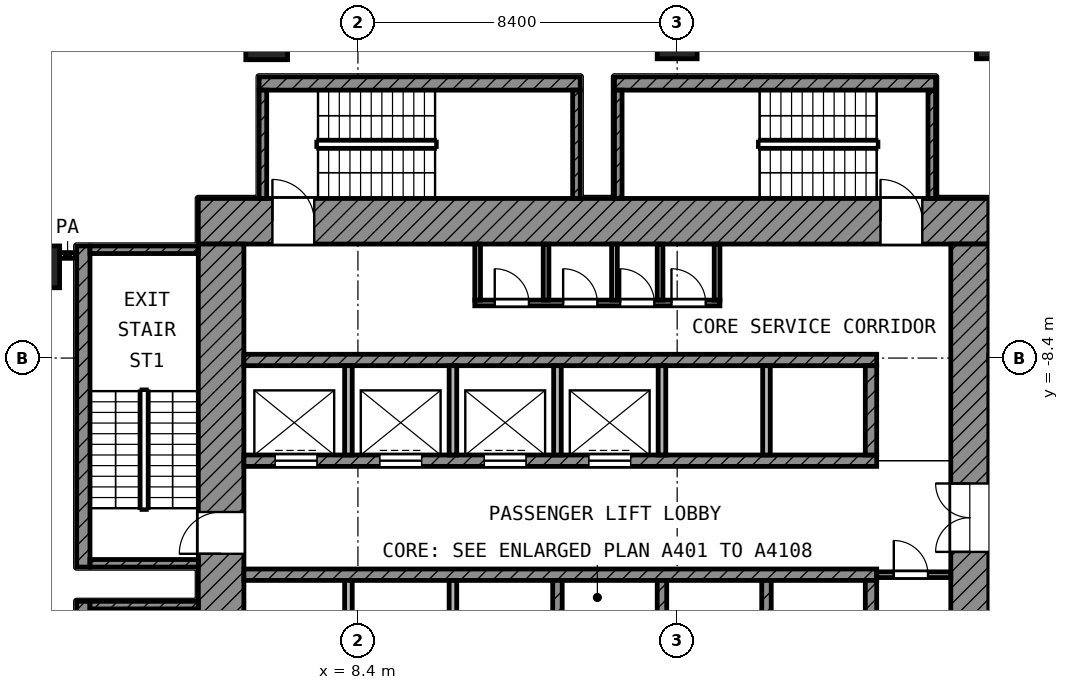
"""IFC4 building model, lengths in metres.
Left out: names, types, materials, properties, quantities, classifications, styles, units other than length and angle.
Written with IfcOpenShell. Run it as: python <this file> out.ifc"""

import sys

from ifc_helpers import new_model, si_unit, direction, frame, frame_2d, origin, origin_2d, place, context, subcontext, project, spatial, rectangle, extrude, element, fill, save


model = new_model("IFC4")
c1 = context("Model", 3, precision=1e-05, world=origin(), true_north=direction((0.0, 1.0)))
c2 = subcontext(c1, "Body", "Model", "MODEL_VIEW")
j1 = project(units=[si_unit("LENGTHUNIT", "METRE"), si_unit("PLANEANGLEUNIT", "RADIAN")], contexts=[c1])
p1 = place(None, origin())
s1 = spatial("IfcSite", under=j1, at=p1, CompositionType="ELEMENT")
p2 = place(p1, origin())
s2 = spatial("IfcBuilding", under=s1, at=p2, CompositionType="ELEMENT")
p3 = place(p2, frame((0.0, 0.0, 115.6)))
s3 = spatial("IfcBuildingStorey", under=s2, at=p3, CompositionType="ELEMENT", Elevation=115.6)
p4 = place(p3, frame((6.0, 0.0, 0.0), z_axis=(0.0, 0.0, 1.0), x_axis=(1.0, 0.0, 0.0)))
e1 = element("IfcColumn", 1, at=p4, inside=s3, PredefinedType="COLUMN", context=c2, shape_type="SweptSolid", body=[
    extrude(rectangle(XDim=1.1, YDim=1.1, at=origin_2d()), origin(), (0.0, 0.0, 1.0), 4.2),
])
for number, where, z_axis, x_axis in (
    (2, (16.8, 0.0, 0.0), (0.0, 0.0, 1.0), (1.0, 0.0, 0.0)),
    (3, (25.2, 0.0, 0.0), (0.0, 0.0, 1.0), (1.0, 0.0, 0.0)),
):
    element("IfcColumn", number, at=place(p3, frame(where, z_axis=z_axis, x_axis=x_axis)), inside=s3, PredefinedType="COLUMN", context=c2, shape_type="SweptSolid", body=[
        extrude(rectangle(XDim=1.05, YDim=1.05, at=origin_2d()), origin(), (0.0, 0.0, 1.0), 4.2),
    ])
p5 = place(p3, frame((0.0, -6.0, 0.0), z_axis=(0.0, 0.0, 1.0), x_axis=(1.0, 0.0, 0.0)))
e4 = element("IfcColumn", 4, at=p5, inside=s3, PredefinedType="COLUMN", context=c2, shape_type="SweptSolid", body=[
    extrude(rectangle(XDim=1.1, YDim=1.1, at=origin_2d()), origin(), (0.0, 0.0, 1.0), 4.2),
])
p6 = place(p3, frame((4.2, -4.8, 0.0), z_axis=(0.0, 0.0, 1.0), x_axis=(1.0, 0.0, 0.0)))
e5 = element("IfcWall", 5, at=p6, inside=s3, PredefinedType="SHEAR", context=c2, shape_type="SweptSolid", body=[
    extrude(rectangle(XDim=20.8, YDim=1.2, at=frame_2d((10.4, 0.0))), origin(), (0.0, 0.0, 1.0), 3.6),
])
p7 = place(p6, frame((1.95, 0.0, 0.0)))
e6 = element("IfcOpeningElement", 6, at=p7, cuts=e5, PredefinedType="OPENING", context=c2, shape_type="SweptSolid", body=[
    extrude(rectangle(XDim=1.1, YDim=2.1, at=frame_2d((0.55, 1.05))), frame((0.0, 0.61, 0.0), z_axis=(0.0, -1.0, 0.0), x_axis=(1.0, 0.0, 0.0)), (0.0, 0.0, 1.0), 1.22),
])
p8 = place(p6, frame((17.95, 0.0, 0.0)))
e7 = element("IfcOpeningElement", 7, at=p8, cuts=e5, PredefinedType="OPENING", context=c2, shape_type="SweptSolid", body=[
    extrude(rectangle(XDim=1.1, YDim=2.1, at=frame_2d((0.55, 1.05))), frame((0.0, 0.61, 0.0), z_axis=(0.0, -1.0, 0.0), x_axis=(1.0, 0.0, 0.0)), (0.0, 0.0, 1.0), 1.22),
])
p9 = place(p3, frame((4.8, -25.0, 0.0), z_axis=(0.0, 0.0, 1.0), x_axis=(0.0, 1.0, 0.0)))
e8 = element("IfcWall", 8, at=p9, inside=s3, PredefinedType="SHEAR", context=c2, shape_type="SweptSolid", body=[
    extrude(rectangle(XDim=19.6, YDim=1.2, at=frame_2d((9.8, 0.0))), origin(), (0.0, 0.0, 1.0), 3.6),
])
p10 = place(p9, frame((11.45, 0.0, 0.0)))
e9 = element("IfcOpeningElement", 9, at=p10, cuts=e8, PredefinedType="OPENING", context=c2, shape_type="SweptSolid", body=[
    extrude(rectangle(XDim=1.1, YDim=2.1, at=frame_2d((0.55, 1.05))), frame((0.0, 0.61, 0.0), z_axis=(0.0, -1.0, 0.0), x_axis=(1.0, 0.0, 0.0)), (0.0, 0.0, 1.0), 1.22),
])
p11 = place(p9, frame((2.15, 0.0, 0.0)))
e10 = element("IfcOpeningElement", 10, at=p11, cuts=e8, PredefinedType="OPENING", context=c2, shape_type="SweptSolid", body=[
    extrude(rectangle(XDim=1.1, YDim=2.1, at=frame_2d((0.55, 1.05))), frame((0.0, 0.61, 0.0), z_axis=(0.0, -1.0, 0.0), x_axis=(1.0, 0.0, 0.0)), (0.0, 0.0, 1.0), 1.22),
])
p12 = place(p3, frame((24.5, -24.0, 0.0), z_axis=(0.0, 0.0, 1.0), x_axis=(0.0, 1.0, 0.0)))
e11 = element("IfcWall", 11, at=p12, inside=s3, PredefinedType="SHEAR", context=c2, shape_type="SweptSolid", body=[
    extrude(rectangle(XDim=18.6, YDim=1.0, at=frame_2d((9.3, 0.0))), origin(), (0.0, 0.0, 1.0), 3.6),
])
p13 = place(p12, frame((10.5, 0.0, 0.0)))
e12 = element("IfcOpeningElement", 12, at=p13, cuts=e11, PredefinedType="OPENING", context=c2, shape_type="SweptSolid", body=[
    extrude(rectangle(XDim=1.8, YDim=2.1, at=frame_2d((0.9, 1.05))), frame((0.0, 0.51, 0.0), z_axis=(0.0, -1.0, 0.0), x_axis=(1.0, 0.0, 0.0)), (0.0, 0.0, 1.0), 1.02),
])
p14 = place(p3, frame((5.4, -8.45, 0.0), z_axis=(0.0, 0.0, 1.0), x_axis=(1.0, 0.0, 0.0)))
e13 = element("IfcWall", 13, at=p14, inside=s3, PredefinedType="SHEAR", context=c2, shape_type="SweptSolid", body=[
    extrude(rectangle(XDim=16.65, YDim=0.3, at=frame_2d((8.325, 0.0))), origin(), (0.0, 0.0, 1.0), 3.6),
])
p15 = place(p3, frame((5.4, -11.1, 0.0), z_axis=(0.0, 0.0, 1.0), x_axis=(1.0, 0.0, 0.0)))
e14 = element("IfcWall", 14, at=p15, inside=s3, PredefinedType="SHEAR", context=c2, shape_type="SweptSolid", body=[
    extrude(rectangle(XDim=16.65, YDim=0.3, at=frame_2d((8.325, 0.0))), origin(), (0.0, 0.0, 1.0), 3.6),
])
p16 = place(p15, frame((0.825, 0.0, 0.0)))
e15 = element("IfcOpeningElement", 15, at=p16, cuts=e14, PredefinedType="OPENING", context=c2, shape_type="SweptSolid", body=[
    extrude(rectangle(XDim=1.1, YDim=2.1, at=frame_2d((0.55, 1.05))), frame((0.0, 0.16, 0.0), z_axis=(0.0, -1.0, 0.0), x_axis=(1.0, 0.0, 0.0)), (0.0, 0.0, 1.0), 0.32),
])
p17 = place(p15, frame((3.575, 0.0, 0.0)))
e16 = element("IfcOpeningElement", 16, at=p17, cuts=e14, PredefinedType="OPENING", context=c2, shape_type="SweptSolid", body=[
    extrude(rectangle(XDim=1.1, YDim=2.1, at=frame_2d((0.55, 1.05))), frame((0.0, 0.16, 0.0), z_axis=(0.0, -1.0, 0.0), x_axis=(1.0, 0.0, 0.0)), (0.0, 0.0, 1.0), 0.32),
])
p18 = place(p15, frame((6.325, 0.0, 0.0)))
e17 = element("IfcOpeningElement", 17, at=p18, cuts=e14, PredefinedType="OPENING", context=c2, shape_type="SweptSolid", body=[
    extrude(rectangle(XDim=1.1, YDim=2.1, at=frame_2d((0.55, 1.05))), frame((0.0, 0.16, 0.0), z_axis=(0.0, -1.0, 0.0), x_axis=(1.0, 0.0, 0.0)), (0.0, 0.0, 1.0), 0.32),
])
p19 = place(p15, frame((9.075, 0.0, 0.0)))
e18 = element("IfcOpeningElement", 18, at=p19, cuts=e14, PredefinedType="OPENING", context=c2, shape_type="SweptSolid", body=[
    extrude(rectangle(XDim=1.1, YDim=2.1, at=frame_2d((0.55, 1.05))), frame((0.0, 0.16, 0.0), z_axis=(0.0, -1.0, 0.0), x_axis=(1.0, 0.0, 0.0)), (0.0, 0.0, 1.0), 0.32),
])
p20 = place(p3, frame((5.4, -14.1, 0.0), z_axis=(0.0, 0.0, 1.0), x_axis=(1.0, 0.0, 0.0)))
e19 = element("IfcWall", 19, at=p20, inside=s3, PredefinedType="SHEAR", context=c2, shape_type="SweptSolid", body=[
    extrude(rectangle(XDim=16.65, YDim=0.3, at=frame_2d((8.325, 0.0))), origin(), (0.0, 0.0, 1.0), 3.6),
])
p21 = place(p3, frame((21.9, -10.95, 0.0), z_axis=(0.0, 0.0, 1.0), x_axis=(0.0, 1.0, 0.0)))
e20 = element("IfcWall", 20, at=p21, inside=s3, PredefinedType="SHEAR", context=c2, shape_type="SweptSolid", body=[
    extrude(rectangle(XDim=2.35, YDim=0.3, at=frame_2d((1.175, 0.0))), origin(), (0.0, 0.0, 1.0), 3.6),
])
p22 = place(p3, frame((21.9, -16.6, 0.0), z_axis=(0.0, 0.0, 1.0), x_axis=(0.0, 1.0, 0.0)))
e21 = element("IfcWall", 21, at=p22, inside=s3, PredefinedType="SHEAR", context=c2, shape_type="SweptSolid", body=[
    extrude(rectangle(XDim=2.35, YDim=0.3, at=frame_2d((1.175, 0.0))), origin(), (0.0, 0.0, 1.0), 3.6),
])
for number, where, z_axis, x_axis in (
    (22, (8.15, -10.95, 0.0), (0.0, 0.0, 1.0), (0.0, 1.0, 0.0)),
    (23, (10.9, -10.95, 0.0), (0.0, 0.0, 1.0), (0.0, 1.0, 0.0)),
    (24, (13.65, -10.95, 0.0), (0.0, 0.0, 1.0), (0.0, 1.0, 0.0)),
    (25, (16.4, -10.95, 0.0), (0.0, 0.0, 1.0), (0.0, 1.0, 0.0)),
    (26, (19.15, -10.95, 0.0), (0.0, 0.0, 1.0), (0.0, 1.0, 0.0)),
):
    element("IfcWall", number, at=place(p3, frame(where, z_axis=z_axis, x_axis=x_axis)), inside=s3, PredefinedType="PARTITIONING", context=c2, shape_type="SweptSolid", body=[
        extrude(rectangle(XDim=2.35, YDim=0.2, at=frame_2d((1.175, 0.0))), origin(), (0.0, 0.0, 1.0), 3.6),
    ])
for number, where, z_axis, x_axis in (
    (27, (8.15, -16.6, 0.0), (0.0, 0.0, 1.0), (0.0, 1.0, 0.0)),
    (28, (10.9, -16.6, 0.0), (0.0, 0.0, 1.0), (0.0, 1.0, 0.0)),
):
    element("IfcWall", number, at=place(p3, frame(where, z_axis=z_axis, x_axis=x_axis)), inside=s3, PredefinedType="PARTITIONING", context=c2, shape_type="SweptSolid", body=[
        extrude(rectangle(XDim=2.35, YDim=0.2, at=frame_2d((1.175, 0.0))), origin(), (0.0, 0.0, 1.0), 3.6),
    ])
for number, where, z_axis, x_axis in (
    (29, (13.65, -16.6, 0.0), (0.0, 0.0, 1.0), (0.0, 1.0, 0.0)),
    (30, (16.4, -16.6, 0.0), (0.0, 0.0, 1.0), (0.0, 1.0, 0.0)),
    (31, (19.15, -16.6, 0.0), (0.0, 0.0, 1.0), (0.0, 1.0, 0.0)),
):
    element("IfcWall", number, at=place(p3, frame(where, z_axis=z_axis, x_axis=x_axis)), inside=s3, PredefinedType="SHEAR", context=c2, shape_type="SweptSolid", body=[
        extrude(rectangle(XDim=2.35, YDim=0.25, at=frame_2d((1.175, 0.0))), origin(), (0.0, 0.0, 1.0), 3.6),
    ])
p23 = place(p3, frame((22.05, -14.1, 0.0), z_axis=(0.0, 0.0, 1.0), x_axis=(1.0, 0.0, 0.0)))
e32 = element("IfcWall", 32, at=p23, inside=s3, PredefinedType="PARTITIONING", context=c2, shape_type="SweptSolid", body=[
    extrude(rectangle(XDim=1.95, YDim=0.15, at=frame_2d((0.975, 0.0))), origin(), (0.0, 0.0, 1.0), 3.6),
])
p24 = place(p23, frame((0.45, 0.0, 0.0)))
e33 = element("IfcOpeningElement", 33, at=p24, cuts=e32, PredefinedType="OPENING", context=c2, shape_type="SweptSolid", body=[
    extrude(rectangle(XDim=0.9, YDim=2.1, at=frame_2d((0.45, 1.05))), frame((0.0, 0.085, 0.0), z_axis=(0.0, -1.0, 0.0), x_axis=(1.0, 0.0, 0.0)), (0.0, 0.0, 1.0), 0.17),
])
p25 = place(p3, frame((11.475, -6.95, 0.0), z_axis=(0.0, 0.0, 1.0), x_axis=(1.0, 0.0, 0.0)))
e34 = element("IfcWall", 34, at=p25, inside=s3, PredefinedType="PARTITIONING", context=c2, shape_type="SweptSolid", body=[
    extrude(rectangle(XDim=6.45, YDim=0.15, at=frame_2d((3.225, 0.0))), origin(), (0.0, 0.0, 1.0), 3.6),
])
p26 = place(p25, frame((0.525, 0.0, 0.0)))
e35 = element("IfcOpeningElement", 35, at=p26, cuts=e34, PredefinedType="OPENING", context=c2, shape_type="SweptSolid", body=[
    extrude(rectangle(XDim=0.9, YDim=2.1, at=frame_2d((0.45, 1.05))), frame((0.0, 0.085, 0.0), z_axis=(0.0, -1.0, 0.0), x_axis=(1.0, 0.0, 0.0)), (0.0, 0.0, 1.0), 0.17),
])
p27 = place(p25, frame((2.325, 0.0, 0.0)))
e36 = element("IfcOpeningElement", 36, at=p27, cuts=e34, PredefinedType="OPENING", context=c2, shape_type="SweptSolid", body=[
    extrude(rectangle(XDim=0.9, YDim=2.1, at=frame_2d((0.45, 1.05))), frame((0.0, 0.085, 0.0), z_axis=(0.0, -1.0, 0.0), x_axis=(1.0, 0.0, 0.0)), (0.0, 0.0, 1.0), 0.17),
])
p28 = place(p25, frame((3.825, 0.0, 0.0)))
e37 = element("IfcOpeningElement", 37, at=p28, cuts=e34, PredefinedType="OPENING", context=c2, shape_type="SweptSolid", body=[
    extrude(rectangle(XDim=0.9, YDim=2.1, at=frame_2d((0.45, 1.05))), frame((0.0, 0.085, 0.0), z_axis=(0.0, -1.0, 0.0), x_axis=(1.0, 0.0, 0.0)), (0.0, 0.0, 1.0), 0.17),
])
p29 = place(p25, frame((5.175, 0.0, 0.0)))
e38 = element("IfcOpeningElement", 38, at=p29, cuts=e34, PredefinedType="OPENING", context=c2, shape_type="SweptSolid", body=[
    extrude(rectangle(XDim=0.9, YDim=2.1, at=frame_2d((0.45, 1.05))), frame((0.0, 0.085, 0.0), z_axis=(0.0, -1.0, 0.0), x_axis=(1.0, 0.0, 0.0)), (0.0, 0.0, 1.0), 0.17),
])
for number, where, z_axis, x_axis in (
    (39, (11.55, -6.875, 0.0), (0.0, 0.0, 1.0), (0.0, 1.0, 0.0)),
    (40, (13.35, -6.875, 0.0), (0.0, 0.0, 1.0), (0.0, 1.0, 0.0)),
    (41, (15.15, -6.875, 0.0), (0.0, 0.0, 1.0), (0.0, 1.0, 0.0)),
    (42, (16.35, -6.875, 0.0), (0.0, 0.0, 1.0), (0.0, 1.0, 0.0)),
    (43, (17.85, -6.875, 0.0), (0.0, 0.0, 1.0), (0.0, 1.0, 0.0)),
):
    element("IfcWall", number, at=place(p3, frame(where, z_axis=z_axis, x_axis=x_axis)), inside=s3, PredefinedType="PARTITIONING", context=c2, shape_type="SweptSolid", body=[
        extrude(rectangle(XDim=1.475, YDim=0.15, at=frame_2d((0.738, 0.0))), origin(), (0.0, 0.0, 1.0), 3.6),
    ])
p30 = place(p3, frame((1.175, -13.9, 0.0), z_axis=(0.0, 0.0, 1.0), x_axis=(0.0, 1.0, 0.0)))
e44 = element("IfcWall", 44, at=p30, inside=s3, PredefinedType="SHEAR", context=c2, shape_type="SweptSolid", body=[
    extrude(rectangle(XDim=8.45, YDim=0.35, at=frame_2d((4.225, 0.0))), origin(), (0.0, 0.0, 1.0), 3.6),
])
for number, where, z_axis, x_axis in (
    (45, (1.35, -5.55, 0.0), (0.0, 0.0, 1.0), (1.0, 0.0, 0.0)),
    (46, (1.35, -13.8, 0.0), (0.0, 0.0, 1.0), (1.0, 0.0, 0.0)),
):
    element("IfcWall", number, at=place(p3, frame(where, z_axis=z_axis, x_axis=x_axis)), inside=s3, PredefinedType="SHEAR", context=c2, shape_type="SweptSolid", body=[
        extrude(rectangle(XDim=2.85, YDim=0.2, at=frame_2d((1.425, 0.0))), origin(), (0.0, 0.0, 1.0), 3.6),
    ])
p31 = place(p3, frame((1.175, -23.25, 0.0), z_axis=(0.0, 0.0, 1.0), x_axis=(0.0, 1.0, 0.0)))
e47 = element("IfcWall", 47, at=p31, inside=s3, PredefinedType="SHEAR", context=c2, shape_type="SweptSolid", body=[
    extrude(rectangle(XDim=8.45, YDim=0.35, at=frame_2d((4.225, 0.0))), origin(), (0.0, 0.0, 1.0), 3.6),
])
p32 = place(p3, frame((1.35, -14.9, 0.0), z_axis=(0.0, 0.0, 1.0), x_axis=(1.0, 0.0, 0.0)))
e48 = element("IfcWall", 48, at=p32, inside=s3, PredefinedType="SHEAR", context=c2, shape_type="SweptSolid", body=[
    extrude(rectangle(XDim=2.85, YDim=0.2, at=frame_2d((1.425, 0.0))), origin(), (0.0, 0.0, 1.0), 3.6),
])
p33 = place(p3, frame((5.8, -1.175, 0.0), z_axis=(0.0, 0.0, 1.0), x_axis=(1.0, 0.0, 0.0)))
e49 = element("IfcWall", 49, at=p33, inside=s3, PredefinedType="SHEAR", context=c2, shape_type="SweptSolid", body=[
    extrude(rectangle(XDim=8.45, YDim=0.35, at=frame_2d((4.225, 0.0))), origin(), (0.0, 0.0, 1.0), 3.6),
])
for number, where, z_axis, x_axis in (
    (50, (5.9, -4.2, 0.0), (0.0, 0.0, 1.0), (0.0, 1.0, 0.0)),
    (51, (14.15, -4.2, 0.0), (0.0, 0.0, 1.0), (0.0, 1.0, 0.0)),
):
    element("IfcWall", number, at=place(p3, frame(where, z_axis=z_axis, x_axis=x_axis)), inside=s3, PredefinedType="SHEAR", context=c2, shape_type="SweptSolid", body=[
        extrude(rectangle(XDim=2.85, YDim=0.2, at=frame_2d((1.425, 0.0))), origin(), (0.0, 0.0, 1.0), 3.6),
    ])
p34 = place(p3, frame((15.15, -1.175, 0.0), z_axis=(0.0, 0.0, 1.0), x_axis=(1.0, 0.0, 0.0)))
e52 = element("IfcWall", 52, at=p34, inside=s3, PredefinedType="SHEAR", context=c2, shape_type="SweptSolid", body=[
    extrude(rectangle(XDim=8.45, YDim=0.35, at=frame_2d((4.225, 0.0))), origin(), (0.0, 0.0, 1.0), 3.6),
])
for number, where, z_axis, x_axis in (
    (53, (15.25, -4.2, 0.0), (0.0, 0.0, 1.0), (0.0, 1.0, 0.0)),
    (54, (23.5, -4.2, 0.0), (0.0, 0.0, 1.0), (0.0, 1.0, 0.0)),
):
    element("IfcWall", number, at=place(p3, frame(where, z_axis=z_axis, x_axis=x_axis)), inside=s3, PredefinedType="SHEAR", context=c2, shape_type="SweptSolid", body=[
        extrude(rectangle(XDim=2.85, YDim=0.2, at=frame_2d((1.425, 0.0))), origin(), (0.0, 0.0, 1.0), 3.6),
    ])
p35 = place(p3, frame((0.55, -5.7, 0.0), z_axis=(0.0, 0.0, 1.0), x_axis=(1.0, 0.0, 0.0)))
e55 = element("IfcWall", 55, at=p35, inside=s3, PredefinedType="PARTITIONING", context=c2, shape_type="SweptSolid", body=[
    extrude(rectangle(XDim=0.42, YDim=0.15, at=frame_2d((0.21, 0.0))), origin(), (0.0, 0.0, 1.0), 3.6),
])
p36 = place(p16, origin())
e56 = element("IfcDoor", 56, at=p36, inside=s3, OperationType="DOUBLE_DOOR_SLIDING", PredefinedType="DOOR", context=c2, shape_type="SweptSolid", body=[
    extrude(rectangle(XDim=1.1, YDim=2.1, at=frame_2d((0.55, 1.05))), frame((0.0, 0.025, 0.0), z_axis=(0.0, -1.0, 0.0), x_axis=(1.0, 0.0, 0.0)), (0.0, 0.0, 1.0), 0.05),
])
fill(e15, e56)
p37 = place(p17, origin())
e57 = element("IfcDoor", 57, at=p37, inside=s3, OperationType="DOUBLE_DOOR_SLIDING", PredefinedType="DOOR", context=c2, shape_type="SweptSolid", body=[
    extrude(rectangle(XDim=1.1, YDim=2.1, at=frame_2d((0.55, 1.05))), frame((0.0, 0.025, 0.0), z_axis=(0.0, -1.0, 0.0), x_axis=(1.0, 0.0, 0.0)), (0.0, 0.0, 1.0), 0.05),
])
fill(e16, e57)
p38 = place(p18, origin())
e58 = element("IfcDoor", 58, at=p38, inside=s3, OperationType="DOUBLE_DOOR_SLIDING", PredefinedType="DOOR", context=c2, shape_type="SweptSolid", body=[
    extrude(rectangle(XDim=1.1, YDim=2.1, at=frame_2d((0.55, 1.05))), frame((0.0, 0.025, 0.0), z_axis=(0.0, -1.0, 0.0), x_axis=(1.0, 0.0, 0.0)), (0.0, 0.0, 1.0), 0.05),
])
fill(e17, e58)
p39 = place(p19, origin())
e59 = element("IfcDoor", 59, at=p39, inside=s3, OperationType="DOUBLE_DOOR_SLIDING", PredefinedType="DOOR", context=c2, shape_type="SweptSolid", body=[
    extrude(rectangle(XDim=1.1, YDim=2.1, at=frame_2d((0.55, 1.05))), frame((0.0, 0.025, 0.0), z_axis=(0.0, -1.0, 0.0), x_axis=(1.0, 0.0, 0.0)), (0.0, 0.0, 1.0), 0.05),
])
fill(e18, e59)
p40 = place(p10, origin())
e60 = element("IfcDoor", 60, at=p40, inside=s3, OperationType="SINGLE_SWING_LEFT", PredefinedType="DOOR", context=c2, shape_type="SweptSolid", body=[
    extrude(rectangle(XDim=1.1, YDim=2.1, at=frame_2d((0.55, 1.05))), frame((0.0, 0.025, 0.0), z_axis=(0.0, -1.0, 0.0), x_axis=(1.0, 0.0, 0.0)), (0.0, 0.0, 1.0), 0.05),
])
fill(e9, e60)
p41 = place(p7, origin())
e61 = element("IfcDoor", 61, at=p41, inside=s3, OperationType="SINGLE_SWING_LEFT", PredefinedType="DOOR", context=c2, shape_type="SweptSolid", body=[
    extrude(rectangle(XDim=1.1, YDim=2.1, at=frame_2d((0.55, 1.05))), frame((0.0, 0.025, 0.0), z_axis=(0.0, -1.0, 0.0), x_axis=(1.0, 0.0, 0.0)), (0.0, 0.0, 1.0), 0.05),
])
fill(e6, e61)
p42 = place(p8, origin())
e62 = element("IfcDoor", 62, at=p42, inside=s3, OperationType="SINGLE_SWING_LEFT", PredefinedType="DOOR", context=c2, shape_type="SweptSolid", body=[
    extrude(rectangle(XDim=1.1, YDim=2.1, at=frame_2d((0.55, 1.05))), frame((0.0, 0.025, 0.0), z_axis=(0.0, -1.0, 0.0), x_axis=(1.0, 0.0, 0.0)), (0.0, 0.0, 1.0), 0.05),
])
fill(e7, e62)
p43 = place(p13, origin())
e63 = element("IfcDoor", 63, at=p43, inside=s3, OperationType="DOUBLE_DOOR_SINGLE_SWING", PredefinedType="DOOR", context=c2, shape_type="SweptSolid", body=[
    extrude(rectangle(XDim=1.8, YDim=2.1, at=frame_2d((0.9, 1.05))), frame((0.0, 0.025, 0.0), z_axis=(0.0, -1.0, 0.0), x_axis=(1.0, 0.0, 0.0)), (0.0, 0.0, 1.0), 0.05),
])
fill(e12, e63)
p44 = place(p26, origin())
e64 = element("IfcDoor", 64, at=p44, inside=s3, OperationType="SINGLE_SWING_LEFT", PredefinedType="DOOR", context=c2, shape_type="SweptSolid", body=[
    extrude(rectangle(XDim=0.9, YDim=2.1, at=frame_2d((0.45, 1.05))), frame((0.0, 0.025, 0.0), z_axis=(0.0, -1.0, 0.0), x_axis=(1.0, 0.0, 0.0)), (0.0, 0.0, 1.0), 0.05),
])
fill(e35, e64)
p45 = place(p27, origin())
e65 = element("IfcDoor", 65, at=p45, inside=s3, OperationType="SINGLE_SWING_LEFT", PredefinedType="DOOR", context=c2, shape_type="SweptSolid", body=[
    extrude(rectangle(XDim=0.9, YDim=2.1, at=frame_2d((0.45, 1.05))), frame((0.0, 0.025, 0.0), z_axis=(0.0, -1.0, 0.0), x_axis=(1.0, 0.0, 0.0)), (0.0, 0.0, 1.0), 0.05),
])
fill(e36, e65)
p46 = place(p28, origin())
e66 = element("IfcDoor", 66, at=p46, inside=s3, OperationType="SINGLE_SWING_LEFT", PredefinedType="DOOR", context=c2, shape_type="SweptSolid", body=[
    extrude(rectangle(XDim=0.9, YDim=2.1, at=frame_2d((0.45, 1.05))), frame((0.0, 0.025, 0.0), z_axis=(0.0, -1.0, 0.0), x_axis=(1.0, 0.0, 0.0)), (0.0, 0.0, 1.0), 0.05),
])
fill(e37, e66)
p47 = place(p29, origin())
e67 = element("IfcDoor", 67, at=p47, inside=s3, OperationType="SINGLE_SWING_LEFT", PredefinedType="DOOR", context=c2, shape_type="SweptSolid", body=[
    extrude(rectangle(XDim=0.9, YDim=2.1, at=frame_2d((0.45, 1.05))), frame((0.0, 0.025, 0.0), z_axis=(0.0, -1.0, 0.0), x_axis=(1.0, 0.0, 0.0)), (0.0, 0.0, 1.0), 0.05),
])
fill(e38, e67)
p48 = place(p24, origin())
e68 = element("IfcDoor", 68, at=p48, inside=s3, OperationType="SINGLE_SWING_LEFT", PredefinedType="DOOR", context=c2, shape_type="SweptSolid", body=[
    extrude(rectangle(XDim=0.9, YDim=2.1, at=frame_2d((0.45, 1.05))), frame((0.0, 0.025, 0.0), z_axis=(0.0, -1.0, 0.0), x_axis=(1.0, 0.0, 0.0)), (0.0, 0.0, 1.0), 0.05),
])
fill(e33, e68)
save(model, sys.argv[1])
